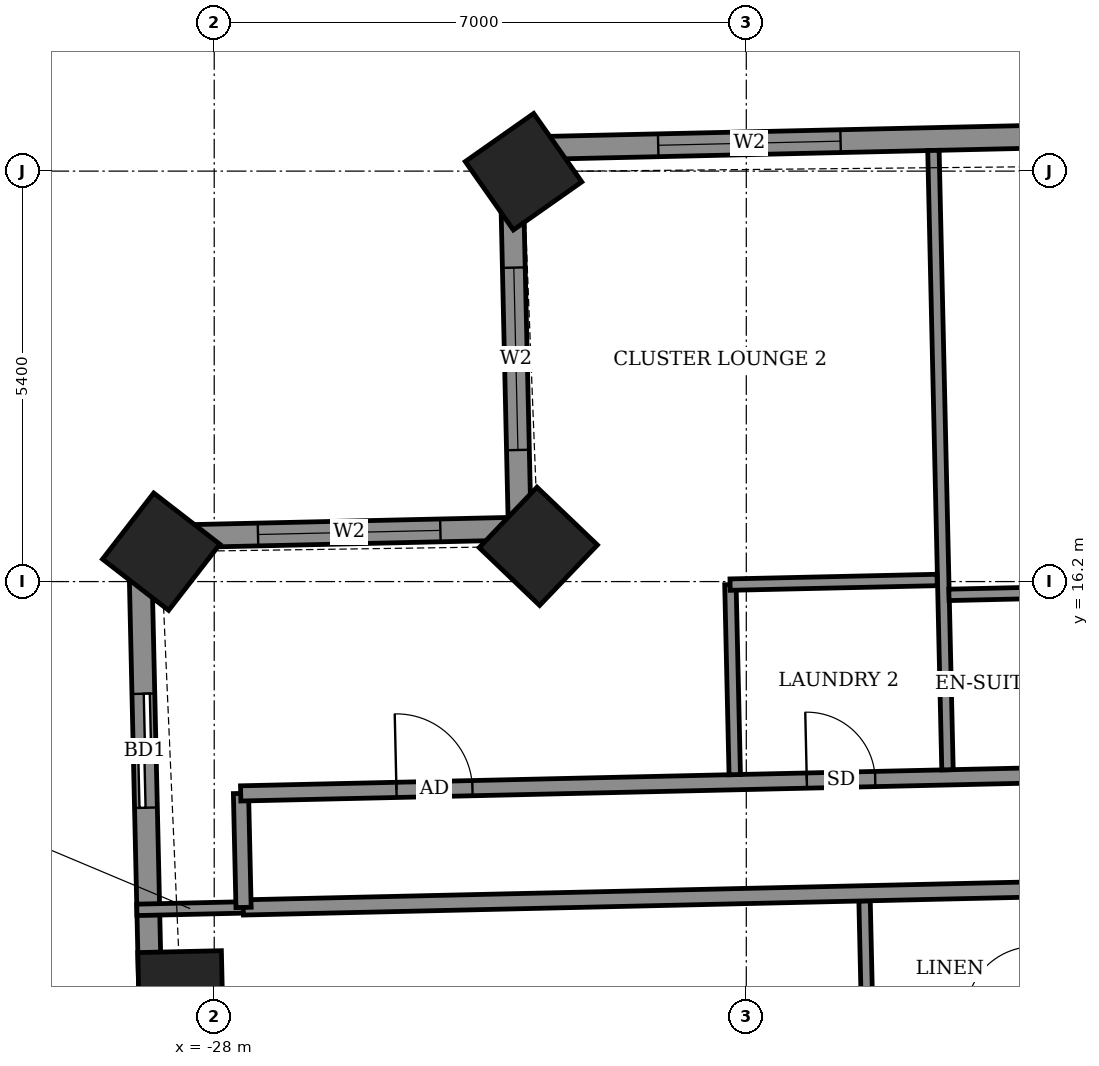
"""IFC4 building model, lengths in metres.
Left out: names, types, materials, properties, quantities, classifications, styles, units other than length and angle.
Written with IfcOpenShell. Run it as: python <this file> out.ifc"""

import sys

from ifc_helpers import new_model, si_unit, direction, frame, frame_2d, origin, origin_2d, place, context, subcontext, project, spatial, rectangle, extrude, element, fill, save


model = new_model("IFC4")
c1 = context("Model", 3, precision=1e-05, world=origin(), true_north=direction((0.0, 1.0)))
c2 = subcontext(c1, "Body", "Model", "MODEL_VIEW")
j1 = project(units=[si_unit("LENGTHUNIT", "METRE"), si_unit("PLANEANGLEUNIT", "RADIAN")], contexts=[c1])
p1 = place(None, origin())
s1 = spatial("IfcSite", under=j1, at=p1, CompositionType="ELEMENT")
p2 = place(p1, origin())
s2 = spatial("IfcBuilding", under=s1, at=p2, CompositionType="ELEMENT")
p3 = place(p2, frame((0.0, 0.0, 238.3)))
s3 = spatial("IfcBuildingStorey", under=s2, at=p3, CompositionType="ELEMENT", Elevation=238.3)
for number, where, z_axis, x_axis in (
    (1, (-23.931, 21.592, -0.55), (0.0, 0.0, 1.0), (-0.818, -0.575, 0.0)),
    (2, (-23.736, 16.664, -0.55), (0.0, 0.0, 1.0), (-0.691, -0.723, 0.0)),
    (3, (-28.698, 16.593, -0.55), (0.0, 0.0, 1.0), (-0.612, -0.791, 0.0)),
    (4, (-28.443, 10.781, -0.55), (0.0, 0.0, 1.0), (0.023, -1.0, 0.0)),
):
    element("IfcColumn", number, at=place(p3, frame(where, z_axis=z_axis, x_axis=x_axis)), inside=s3, PredefinedType="COLUMN", context=c2, shape_type="SweptSolid", body=[
        extrude(rectangle(XDim=1.1, YDim=1.1, at=origin_2d()), origin(), (0.0, 0.0, 1.0), 3.6),
    ])
p4 = place(p3, frame((20.403, 22.905, 0.0), z_axis=(0.0, 0.0, 1.0), x_axis=(-0.99974298964, -0.022670568288, 0.0)))
e5 = element("IfcWall", 5, at=p4, inside=s3, PredefinedType="SOLIDWALL", context=c2, shape_type="SweptSolid", body=[
    extrude(rectangle(XDim=44.509, YDim=0.3, at=frame_2d((22.254, 0.0))), origin(), (0.0, 0.0, 1.0), 2.55),
])
p5 = place(p4, frame((1.62, 0.0, 0.0)))
e6 = element("IfcOpeningElement", 6, at=p5, cuts=e5, PredefinedType="OPENING", context=c2, shape_type="SweptSolid", body=[
    extrude(rectangle(XDim=1.5, YDim=2.4, at=frame_2d((0.75, 1.2))), frame((0.0, 0.16, 0.0), z_axis=(0.0, -1.0, 0.0), x_axis=(1.0, 0.0, 0.0)), (0.0, 0.0, 1.0), 0.32),
])
p6 = place(p4, frame((4.813, 0.0, 0.0)))
e7 = element("IfcOpeningElement", 7, at=p6, cuts=e5, PredefinedType="OPENING", context=c2, shape_type="SweptSolid", body=[
    extrude(rectangle(XDim=1.5, YDim=2.4, at=frame_2d((0.75, 1.2))), frame((0.0, 0.16, 0.0), z_axis=(0.0, -1.0, 0.0), x_axis=(1.0, 0.0, 0.0)), (0.0, 0.0, 1.0), 0.32),
])
p7 = place(p4, frame((9.833, 0.0, 0.0)))
e8 = element("IfcOpeningElement", 8, at=p7, cuts=e5, PredefinedType="OPENING", context=c2, shape_type="SweptSolid", body=[
    extrude(rectangle(XDim=1.5, YDim=2.4, at=frame_2d((0.75, 1.2))), frame((0.0, 0.16, 0.0), z_axis=(0.0, -1.0, 0.0), x_axis=(1.0, 0.0, 0.0)), (0.0, 0.0, 1.0), 0.32),
])
p8 = place(p4, frame((15.522, 0.0, 0.0)))
e9 = element("IfcOpeningElement", 9, at=p8, cuts=e5, PredefinedType="OPENING", context=c2, shape_type="SweptSolid", body=[
    extrude(rectangle(XDim=1.2, YDim=2.4, at=frame_2d((0.6, 1.2))), frame((0.0, 0.16, 0.0), z_axis=(0.0, -1.0, 0.0), x_axis=(1.0, 0.0, 0.0)), (0.0, 0.0, 1.0), 0.32),
])
p9 = place(p4, frame((18.558, 0.0, 0.0)))
e10 = element("IfcOpeningElement", 10, at=p9, cuts=e5, PredefinedType="OPENING", context=c2, shape_type="SweptSolid", body=[
    extrude(rectangle(XDim=1.5, YDim=2.4, at=frame_2d((0.75, 1.2))), frame((0.0, 0.16, 0.0), z_axis=(0.0, -1.0, 0.0), x_axis=(1.0, 0.0, 0.0)), (0.0, 0.0, 1.0), 0.32),
])
p10 = place(p4, frame((23.456, 0.0, 0.0)))
e11 = element("IfcOpeningElement", 11, at=p10, cuts=e5, PredefinedType="OPENING", context=c2, shape_type="SweptSolid", body=[
    extrude(rectangle(XDim=1.5, YDim=2.4, at=frame_2d((0.75, 1.2))), frame((0.0, 0.16, 0.0), z_axis=(0.0, -1.0, 0.0), x_axis=(1.0, 0.0, 0.0)), (0.0, 0.0, 1.0), 0.32),
])
p11 = place(p4, frame((26.89, 0.0, 0.0)))
e12 = element("IfcOpeningElement", 12, at=p11, cuts=e5, PredefinedType="OPENING", context=c2, shape_type="SweptSolid", body=[
    extrude(rectangle(XDim=1.5, YDim=2.4, at=frame_2d((0.75, 1.2))), frame((0.0, 0.16, 0.0), z_axis=(0.0, -1.0, 0.0), x_axis=(1.0, 0.0, 0.0)), (0.0, 0.0, 1.0), 0.32),
])
p12 = place(p4, frame((31.708, 0.0, 0.0)))
e13 = element("IfcOpeningElement", 13, at=p12, cuts=e5, PredefinedType="OPENING", context=c2, shape_type="SweptSolid", body=[
    extrude(rectangle(XDim=1.5, YDim=2.4, at=frame_2d((0.75, 1.2))), frame((0.0, 0.16, 0.0), z_axis=(0.0, -1.0, 0.0), x_axis=(1.0, 0.0, 0.0)), (0.0, 0.0, 1.0), 0.32),
])
p13 = place(p4, frame((35.024, 0.0, 0.0)))
e14 = element("IfcOpeningElement", 14, at=p13, cuts=e5, PredefinedType="OPENING", context=c2, shape_type="SweptSolid", body=[
    extrude(rectangle(XDim=1.5, YDim=2.4, at=frame_2d((0.75, 1.2))), frame((0.0, 0.16, 0.0), z_axis=(0.0, -1.0, 0.0), x_axis=(1.0, 0.0, 0.0)), (0.0, 0.0, 1.0), 0.32),
])
p14 = place(p4, frame((40.173, 0.0, 0.9)))
e15 = element("IfcOpeningElement", 15, at=p14, cuts=e5, PredefinedType="OPENING", context=c2, shape_type="SweptSolid", body=[
    extrude(rectangle(XDim=2.4, YDim=1.5, at=frame_2d((1.2, 0.75))), frame((0.0, 0.16, 0.0), z_axis=(0.0, -1.0, 0.0), x_axis=(1.0, 0.0, 0.0)), (0.0, 0.0, 1.0), 0.32),
])
p15 = place(p3, frame((-24.094, 21.896, 0.0), z_axis=(0.0, 0.0, 1.0), x_axis=(0.022606059803, -0.999744450377, 0.0)))
e16 = element("IfcWall", 16, at=p15, inside=s3, PredefinedType="SOLIDWALL", context=c2, shape_type="SweptSolid", body=[
    extrude(rectangle(XDim=5.0, YDim=0.3, at=frame_2d((2.5, 0.0))), origin(), (0.0, 0.0, 1.0), 2.55),
])
p16 = place(p15, frame((1.566, 0.0, 0.9)))
e17 = element("IfcOpeningElement", 17, at=p16, cuts=e16, PredefinedType="OPENING", context=c2, shape_type="SweptSolid", body=[
    extrude(rectangle(XDim=2.4, YDim=1.5, at=frame_2d((1.2, 0.75))), frame((0.0, 0.16, 0.0), z_axis=(0.0, -1.0, 0.0), x_axis=(1.0, 0.0, 0.0)), (0.0, 0.0, 1.0), 0.32),
])
p17 = place(p3, frame((-23.981, 16.897, 0.0), z_axis=(0.0, 0.0, 1.0), x_axis=(-0.999744350543, -0.022610474516, 0.0)))
e18 = element("IfcWall", 18, at=p17, inside=s3, PredefinedType="SOLIDWALL", context=c2, shape_type="SweptSolid", body=[
    extrude(rectangle(XDim=4.999, YDim=0.3, at=frame_2d((2.5, 0.0))), origin(), (0.0, 0.0, 1.0), 2.55),
])
p18 = place(p17, frame((1.044, 0.0, 0.9)))
e19 = element("IfcOpeningElement", 19, at=p18, cuts=e18, PredefinedType="OPENING", context=c2, shape_type="SweptSolid", body=[
    extrude(rectangle(XDim=2.4, YDim=1.5, at=frame_2d((1.2, 0.75))), frame((0.0, 0.16, 0.0), z_axis=(0.0, -1.0, 0.0), x_axis=(1.0, 0.0, 0.0)), (0.0, 0.0, 1.0), 0.32),
])
p19 = place(p3, frame((-28.979, 16.784, 0.0), z_axis=(0.0, 0.0, 1.0), x_axis=(0.022685159264, -0.999742658662, 0.0)))
e20 = element("IfcWall", 20, at=p19, inside=s3, PredefinedType="SOLIDWALL", context=c2, shape_type="SweptSolid", body=[
    extrude(rectangle(XDim=12.699, YDim=0.3, at=frame_2d((6.35, 0.0))), origin(), (0.0, 0.0, 1.0), 2.55),
])
p20 = place(p19, frame((2.06, 0.0, 0.0)))
e21 = element("IfcOpeningElement", 21, at=p20, cuts=e20, PredefinedType="OPENING", context=c2, shape_type="SweptSolid", body=[
    extrude(rectangle(XDim=1.5, YDim=2.4, at=frame_2d((0.75, 1.2))), frame((0.0, 0.16, 0.0), z_axis=(0.0, -1.0, 0.0), x_axis=(1.0, 0.0, 0.0)), (0.0, 0.0, 1.0), 0.32),
])
p21 = place(p19, frame((7.169, 0.0, 0.9)))
e22 = element("IfcOpeningElement", 22, at=p21, cuts=e20, PredefinedType="OPENING", context=c2, shape_type="SweptSolid", body=[
    extrude(rectangle(XDim=1.2, YDim=1.5, at=frame_2d((0.6, 0.75))), frame((0.0, 0.16, 0.0), z_axis=(0.0, -1.0, 0.0), x_axis=(1.0, 0.0, 0.0)), (0.0, 0.0, 1.0), 0.32),
])
p22 = place(p19, frame((9.899, 0.0, 0.9)))
e23 = element("IfcOpeningElement", 23, at=p22, cuts=e20, PredefinedType="OPENING", context=c2, shape_type="SweptSolid", body=[
    extrude(rectangle(XDim=1.2, YDim=1.5, at=frame_2d((0.6, 0.75))), frame((0.0, 0.16, 0.0), z_axis=(0.0, -1.0, 0.0), x_axis=(1.0, 0.0, 0.0)), (0.0, 0.0, 1.0), 0.32),
])
p23 = place(p3, frame((-19.392, 9.699, 0.0), z_axis=(0.0, 0.0, 1.0), x_axis=(-0.022603288534, 0.999744513037, 0.0)))
e24 = element("IfcWall", 24, at=p23, inside=s3, PredefinedType="PARTITIONING", context=c2, shape_type="SweptSolid", body=[
    extrude(rectangle(XDim=2.301, YDim=0.15, at=frame_2d((1.15, 0.0))), origin(), (0.0, 0.0, 1.0), 3.05),
])
p24 = place(p3, frame((-29.018, 11.881, 0.0), z_axis=(0.0, 0.0, 1.0), x_axis=(0.999740667531, 0.022772739949, 0.0)))
e25 = element("IfcWall", 25, at=p24, inside=s3, PredefinedType="PARTITIONING", context=c2, shape_type="SweptSolid", body=[
    extrude(rectangle(XDim=1.404, YDim=0.15, at=frame_2d((0.702, 0.0))), origin(), (0.0, 0.0, 1.0), 2.55),
])
p25 = place(p3, frame((-27.618, 11.913, 0.0), z_axis=(0.0, 0.0, 1.0), x_axis=(0.999741483035, 0.022736910479, 0.0)))
e26 = element("IfcWall", 26, at=p25, inside=s3, PredefinedType="PARTITIONING", context=c2, shape_type="SweptSolid", body=[
    extrude(rectangle(XDim=10.373, YDim=0.2, at=frame_2d((5.186, 0.0))), origin(), (0.0, 0.0, 1.0), 3.05),
])
p26 = place(p3, frame((-27.614, 11.913, 0.0), z_axis=(0.0, 0.0, 1.0), x_axis=(-0.022617910375, 0.999744182344, 0.0)))
e27 = element("IfcWall", 27, at=p26, inside=s3, PredefinedType="PARTITIONING", context=c2, shape_type="SweptSolid", body=[
    extrude(rectangle(XDim=1.5, YDim=0.2, at=frame_2d((0.75, 0.0))), origin(), (0.0, 0.0, 1.0), 3.05),
])
p27 = place(p3, frame((-27.652, 13.413, 0.0), z_axis=(0.0, 0.0, 1.0), x_axis=(0.999742610679, 0.022687273792, 0.0)))
e28 = element("IfcWall", 28, at=p27, inside=s3, PredefinedType="PARTITIONING", context=c2, shape_type="SweptSolid", body=[
    extrude(rectangle(XDim=50.857, YDim=0.2, at=frame_2d((25.429, 0.0))), origin(), (0.0, 0.0, 1.0), 3.05),
])
p28 = place(p27, frame((49.179, 0.0, 0.0)))
e29 = element("IfcOpeningElement", 29, at=p28, cuts=e28, PredefinedType="OPENING", context=c2, shape_type="SweptSolid", body=[
    extrude(rectangle(XDim=1.0, YDim=2.1, at=frame_2d((0.5, 1.05))), frame((0.0, 0.11, 0.0), z_axis=(0.0, -1.0, 0.0), x_axis=(1.0, 0.0, 0.0)), (0.0, 0.0, 1.0), 0.22),
])
p29 = place(p27, frame((44.9, 0.0, 0.0)))
e30 = element("IfcOpeningElement", 30, at=p29, cuts=e28, PredefinedType="OPENING", context=c2, shape_type="SweptSolid", body=[
    extrude(rectangle(XDim=0.9, YDim=2.1, at=frame_2d((0.45, 1.05))), frame((0.0, 0.11, 0.0), z_axis=(0.0, -1.0, 0.0), x_axis=(1.0, 0.0, 0.0)), (0.0, 0.0, 1.0), 0.22),
])
p30 = place(p27, frame((40.375, 0.0, 0.0)))
e31 = element("IfcOpeningElement", 31, at=p30, cuts=e28, PredefinedType="OPENING", context=c2, shape_type="SweptSolid", body=[
    extrude(rectangle(XDim=0.9, YDim=2.1, at=frame_2d((0.45, 1.05))), frame((0.0, 0.11, 0.0), z_axis=(0.0, -1.0, 0.0), x_axis=(1.0, 0.0, 0.0)), (0.0, 0.0, 1.0), 0.22),
])
p31 = place(p27, frame((38.425, 0.0, 0.0)))
e32 = element("IfcOpeningElement", 32, at=p31, cuts=e28, PredefinedType="OPENING", context=c2, shape_type="SweptSolid", body=[
    extrude(rectangle(XDim=0.9, YDim=2.1, at=frame_2d((0.45, 1.05))), frame((0.0, 0.11, 0.0), z_axis=(0.0, -1.0, 0.0), x_axis=(1.0, 0.0, 0.0)), (0.0, 0.0, 1.0), 0.22),
])
p32 = place(p27, frame((31.625, 0.0, 0.0)))
e33 = element("IfcOpeningElement", 33, at=p32, cuts=e28, PredefinedType="OPENING", context=c2, shape_type="SweptSolid", body=[
    extrude(rectangle(XDim=0.9, YDim=2.1, at=frame_2d((0.45, 1.05))), frame((0.0, 0.11, 0.0), z_axis=(0.0, -1.0, 0.0), x_axis=(1.0, 0.0, 0.0)), (0.0, 0.0, 1.0), 0.22),
])
p33 = place(p27, frame((29.7, 0.0, 0.0)))
e34 = element("IfcOpeningElement", 34, at=p33, cuts=e28, PredefinedType="OPENING", context=c2, shape_type="SweptSolid", body=[
    extrude(rectangle(XDim=0.9, YDim=2.1, at=frame_2d((0.45, 1.05))), frame((0.0, 0.11, 0.0), z_axis=(0.0, -1.0, 0.0), x_axis=(1.0, 0.0, 0.0)), (0.0, 0.0, 1.0), 0.22),
])
p34 = place(p27, frame((22.95, 0.0, 0.0)))
e35 = element("IfcOpeningElement", 35, at=p34, cuts=e28, PredefinedType="OPENING", context=c2, shape_type="SweptSolid", body=[
    extrude(rectangle(XDim=0.9, YDim=2.1, at=frame_2d((0.45, 1.05))), frame((0.0, 0.11, 0.0), z_axis=(0.0, -1.0, 0.0), x_axis=(1.0, 0.0, 0.0)), (0.0, 0.0, 1.0), 0.22),
])
p35 = place(p27, frame((20.95, 0.0, 0.0)))
e36 = element("IfcOpeningElement", 36, at=p35, cuts=e28, PredefinedType="OPENING", context=c2, shape_type="SweptSolid", body=[
    extrude(rectangle(XDim=0.9, YDim=2.1, at=frame_2d((0.45, 1.05))), frame((0.0, 0.11, 0.0), z_axis=(0.0, -1.0, 0.0), x_axis=(1.0, 0.0, 0.0)), (0.0, 0.0, 1.0), 0.22),
])
p36 = place(p27, frame((14.15, 0.0, 0.0)))
e37 = element("IfcOpeningElement", 37, at=p36, cuts=e28, PredefinedType="OPENING", context=c2, shape_type="SweptSolid", body=[
    extrude(rectangle(XDim=0.9, YDim=2.1, at=frame_2d((0.45, 1.05))), frame((0.0, 0.11, 0.0), z_axis=(0.0, -1.0, 0.0), x_axis=(1.0, 0.0, 0.0)), (0.0, 0.0, 1.0), 0.22),
])
p37 = place(p27, frame((12.2, 0.0, 0.0)))
e38 = element("IfcOpeningElement", 38, at=p37, cuts=e28, PredefinedType="OPENING", context=c2, shape_type="SweptSolid", body=[
    extrude(rectangle(XDim=0.9, YDim=2.1, at=frame_2d((0.45, 1.05))), frame((0.0, 0.11, 0.0), z_axis=(0.0, -1.0, 0.0), x_axis=(1.0, 0.0, 0.0)), (0.0, 0.0, 1.0), 0.22),
])
p38 = place(p27, frame((2.05, 0.0, 0.0)))
e39 = element("IfcOpeningElement", 39, at=p38, cuts=e28, PredefinedType="OPENING", context=c2, shape_type="SweptSolid", body=[
    extrude(rectangle(XDim=1.0, YDim=2.1, at=frame_2d((0.5, 1.05))), frame((0.0, 0.11, 0.0), z_axis=(0.0, -1.0, 0.0), x_axis=(1.0, 0.0, 0.0)), (0.0, 0.0, 1.0), 0.22),
])
p39 = place(p27, frame((7.45, 0.0, 0.0)))
e40 = element("IfcOpeningElement", 40, at=p39, cuts=e28, PredefinedType="OPENING", context=c2, shape_type="SweptSolid", body=[
    extrude(rectangle(XDim=0.9, YDim=2.1, at=frame_2d((0.45, 1.05))), frame((0.0, 0.11, 0.0), z_axis=(0.0, -1.0, 0.0), x_axis=(1.0, 0.0, 0.0)), (0.0, 0.0, 1.0), 0.22),
])
p40 = place(p3, frame((-21.152, 13.66, 0.0), z_axis=(0.0, 0.0, 1.0), x_axis=(-0.02274801823, 0.999741230352, 0.0)))
e41 = element("IfcWall", 41, at=p40, inside=s3, PredefinedType="PARTITIONING", context=c2, shape_type="SweptSolid", body=[
    extrude(rectangle(XDim=2.501, YDim=0.15, at=frame_2d((1.25, 0.0))), origin(), (0.0, 0.0, 1.0), 3.05),
])
p41 = place(p3, frame((-18.353, 13.724, 0.0), z_axis=(0.0, 0.0, 1.0), x_axis=(-0.022706435224, 0.999742175663, 0.0)))
e42 = element("IfcWall", 42, at=p41, inside=s3, PredefinedType="PARTITIONING", context=c2, shape_type="SweptSolid", body=[
    extrude(rectangle(XDim=8.15, YDim=0.15, at=frame_2d((4.075, 0.0))), origin(), (0.0, 0.0, 1.0), 2.55),
])
p42 = place(p3, frame((-18.334, 16.025, 0.0), z_axis=(0.0, 0.0, 1.0), x_axis=(0.999740260747, 0.02279059109, 0.0)))
e43 = element("IfcWall", 43, at=p42, inside=s3, PredefinedType="PARTITIONING", context=c2, shape_type="SweptSolid", body=[
    extrude(rectangle(XDim=2.324, YDim=0.15, at=frame_2d((1.162, 0.0))), origin(), (0.0, 0.0, 1.0), 3.05),
])
p43 = place(p3, frame((-21.213, 16.16, 0.0), z_axis=(0.0, 0.0, 1.0), x_axis=(0.999749047428, 0.022401833993, 0.0)))
e44 = element("IfcWall", 44, at=p43, inside=s3, PredefinedType="PARTITIONING", context=c2, shape_type="SweptSolid", body=[
    extrude(rectangle(XDim=2.725, YDim=0.15, at=frame_2d((1.362, 0.0))), origin(), (0.0, 0.0, 1.0), 3.05),
])
p44 = place(p14, origin())
e45 = element("IfcWindow", 45, at=p44, inside=s3, PartitioningType="DOUBLE_PANEL_VERTICAL", PredefinedType="WINDOW", context=c2, shape_type="SweptSolid", body=[
    extrude(rectangle(XDim=2.4, YDim=1.5, at=frame_2d((1.2, 0.75))), frame((0.0, 0.03, 0.0), z_axis=(0.0, -1.0, 0.0), x_axis=(1.0, 0.0, 0.0)), (0.0, 0.0, 1.0), 0.06),
])
fill(e15, e45)
p45 = place(p16, origin())
e46 = element("IfcWindow", 46, at=p45, inside=s3, PartitioningType="DOUBLE_PANEL_VERTICAL", PredefinedType="WINDOW", context=c2, shape_type="SweptSolid", body=[
    extrude(rectangle(XDim=2.4, YDim=1.5, at=frame_2d((1.2, 0.75))), frame((0.0, 0.03, 0.0), z_axis=(0.0, -1.0, 0.0), x_axis=(1.0, 0.0, 0.0)), (0.0, 0.0, 1.0), 0.06),
])
fill(e17, e46)
p46 = place(p18, origin())
e47 = element("IfcWindow", 47, at=p46, inside=s3, PartitioningType="DOUBLE_PANEL_VERTICAL", PredefinedType="WINDOW", context=c2, shape_type="SweptSolid", body=[
    extrude(rectangle(XDim=2.4, YDim=1.5, at=frame_2d((1.2, 0.75))), frame((0.0, 0.03, 0.0), z_axis=(0.0, -1.0, 0.0), x_axis=(1.0, 0.0, 0.0)), (0.0, 0.0, 1.0), 0.06),
])
fill(e19, e47)
p47 = place(p20, origin())
e48 = element("IfcDoor", 48, at=p47, inside=s3, OperationType="SLIDING_TO_LEFT", PredefinedType="DOOR", context=c2, shape_type="SweptSolid", body=[
    extrude(rectangle(XDim=1.5, YDim=2.4, at=frame_2d((0.75, 1.2))), frame((0.0, 0.025, 0.0), z_axis=(0.0, -1.0, 0.0), x_axis=(1.0, 0.0, 0.0)), (0.0, 0.0, 1.0), 0.05),
])
fill(e21, e48)
p48 = place(p38, origin())
e49 = element("IfcDoor", 49, at=p48, inside=s3, OperationType="SINGLE_SWING_RIGHT", PredefinedType="DOOR", context=c2, shape_type="SweptSolid", body=[
    extrude(rectangle(XDim=1.0, YDim=2.1, at=frame_2d((0.5, 1.05))), frame((0.0, 0.025, 0.0), z_axis=(0.0, -1.0, 0.0), x_axis=(1.0, 0.0, 0.0)), (0.0, 0.0, 1.0), 0.05),
])
fill(e39, e49)
p49 = place(p39, origin())
e50 = element("IfcDoor", 50, at=p49, inside=s3, OperationType="SINGLE_SWING_LEFT", PredefinedType="DOOR", context=c2, shape_type="SweptSolid", body=[
    extrude(rectangle(XDim=0.9, YDim=2.1, at=frame_2d((0.45, 1.05))), frame((0.0, 0.025, 0.0), z_axis=(0.0, -1.0, 0.0), x_axis=(1.0, 0.0, 0.0)), (0.0, 0.0, 1.0), 0.05),
])
fill(e40, e50)
save(model, sys.argv[1])
